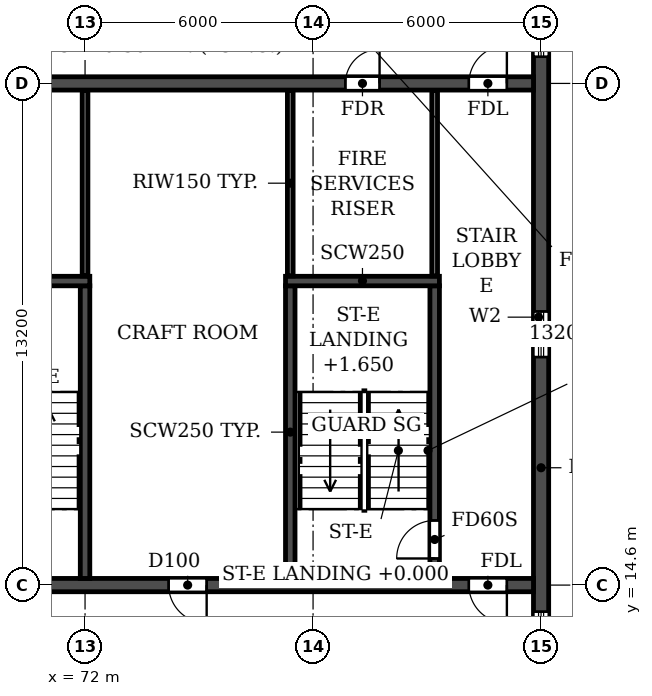
"""IFC4 building model, lengths in metres.
Left out: names, types, materials, properties, quantities, classifications, styles, units other than length and angle.
Written with IfcOpenShell. Run it as: python <this file> out.ifc"""

import sys

from ifc_helpers import new_model, si_unit, direction, frame, frame_2d, origin, place, context, subcontext, project, spatial, rectangle, extrude, element, fill, save


model = new_model("IFC4")
c1 = context("Model", 3, precision=1e-05, world=origin(), true_north=direction((0.0, 1.0)))
c2 = subcontext(c1, "Body", "Model", "MODEL_VIEW")
j1 = project(units=[si_unit("LENGTHUNIT", "METRE"), si_unit("PLANEANGLEUNIT", "RADIAN")], contexts=[c1])
p1 = place(None, origin())
s1 = spatial("IfcSite", under=j1, at=p1, CompositionType="ELEMENT")
p2 = place(p1, origin())
s2 = spatial("IfcBuilding", under=s1, at=p2, CompositionType="ELEMENT")
p3 = place(p2, frame((0.0, 0.0, 251.1)))
s3 = spatial("IfcBuildingStorey", under=s2, at=p3, CompositionType="ELEMENT", Elevation=251.1)
p4 = place(p3, frame((84.0, 4.683, 0.0), z_axis=(0.0, 0.0, 1.0), x_axis=(0.0, 1.0, 0.0)))
e1 = element("IfcWall", 1, at=p4, inside=s3, PredefinedType="SHEAR", context=c2, shape_type="SweptSolid", body=[
    extrude(rectangle(XDim=31.834, YDim=0.4, at=frame_2d((15.917, 0.0))), origin(), (0.0, 0.0, 1.0), 3.08),
])
p5 = place(p4, frame((23.817, 0.0, 0.9)))
e2 = element("IfcOpeningElement", 2, at=p5, cuts=e1, PredefinedType="OPENING", context=c2, shape_type="SweptSolid", body=[
    extrude(rectangle(XDim=1.2, YDim=1.5, at=frame_2d((0.6, 0.75))), frame((0.0, 0.21, 0.0), z_axis=(0.0, -1.0, 0.0), x_axis=(1.0, 0.0, 0.0)), (0.0, 0.0, 1.0), 0.42),
])
p6 = place(p4, frame((8.017, 0.0, 0.9)))
e3 = element("IfcOpeningElement", 3, at=p6, cuts=e1, PredefinedType="OPENING", context=c2, shape_type="SweptSolid", body=[
    extrude(rectangle(XDim=1.2, YDim=1.5, at=frame_2d((0.6, 0.75))), frame((0.0, 0.21, 0.0), z_axis=(0.0, -1.0, 0.0), x_axis=(1.0, 0.0, 0.0)), (0.0, 0.0, 1.0), 0.42),
])
p7 = place(p4, frame((27.694, 0.0, 0.6)))
e4 = element("IfcOpeningElement", 4, at=p7, cuts=e1, PredefinedType="OPENING", context=c2, shape_type="SweptSolid", body=[
    extrude(rectangle(XDim=2.2, YDim=1.8, at=frame_2d((1.1, 0.9))), frame((0.0, 0.21, 0.0), z_axis=(0.0, -1.0, 0.0), x_axis=(1.0, 0.0, 0.0)), (0.0, 0.0, 1.0), 0.42),
])
p8 = place(p4, frame((2.541, 0.0, 0.6)))
e5 = element("IfcOpeningElement", 5, at=p8, cuts=e1, PredefinedType="OPENING", context=c2, shape_type="SweptSolid", body=[
    extrude(rectangle(XDim=2.2, YDim=1.8, at=frame_2d((1.1, 0.9))), frame((0.0, 0.21, 0.0), z_axis=(0.0, -1.0, 0.0), x_axis=(1.0, 0.0, 0.0)), (0.0, 0.0, 1.0), 0.42),
])
p9 = place(p4, frame((15.917, 0.0, 0.9)))
e6 = element("IfcOpeningElement", 6, at=p9, cuts=e1, PredefinedType="OPENING", context=c2, shape_type="SweptSolid", body=[
    extrude(rectangle(XDim=1.2, YDim=1.5, at=frame_2d((0.6, 0.75))), frame((0.0, 0.21, 0.0), z_axis=(0.0, -1.0, 0.0), x_axis=(1.0, 0.0, 0.0)), (0.0, 0.0, 1.0), 0.42),
])
p10 = place(p3, frame((18.2, 14.6, 0.0), z_axis=(0.0, 0.0, 1.0), x_axis=(1.0, 0.0, 0.0)))
e7 = element("IfcWall", 7, at=p10, inside=s3, PredefinedType="SOLIDWALL", context=c2, shape_type="SweptSolid", body=[
    extrude(rectangle(XDim=65.6, YDim=0.35, at=frame_2d((32.8, 0.0))), origin(), (0.0, 0.0, 1.0), 3.08),
])
p11 = place(p10, frame((0.7, 0.0, 0.0)))
e8 = element("IfcOpeningElement", 8, at=p11, cuts=e7, PredefinedType="OPENING", context=c2, shape_type="SweptSolid", body=[
    extrude(rectangle(XDim=1.0, YDim=2.1, at=frame_2d((0.5, 1.05))), frame((0.0, 0.185, 0.0), z_axis=(0.0, -1.0, 0.0), x_axis=(1.0, 0.0, 0.0)), (0.0, 0.0, 1.0), 0.37),
])
p12 = place(p10, frame((8.6, 0.0, 0.0)))
e9 = element("IfcOpeningElement", 9, at=p12, cuts=e7, PredefinedType="OPENING", context=c2, shape_type="SweptSolid", body=[
    extrude(rectangle(XDim=1.0, YDim=2.1, at=frame_2d((0.5, 1.05))), frame((0.0, 0.185, 0.0), z_axis=(0.0, -1.0, 0.0), x_axis=(1.0, 0.0, 0.0)), (0.0, 0.0, 1.0), 0.37),
])
p13 = place(p10, frame((13.2, 0.0, 0.0)))
e10 = element("IfcOpeningElement", 10, at=p13, cuts=e7, PredefinedType="OPENING", context=c2, shape_type="SweptSolid", body=[
    extrude(rectangle(XDim=1.0, YDim=2.1, at=frame_2d((0.5, 1.05))), frame((0.0, 0.185, 0.0), z_axis=(0.0, -1.0, 0.0), x_axis=(1.0, 0.0, 0.0)), (0.0, 0.0, 1.0), 0.37),
])
p14 = place(p10, frame((24.5, 0.0, 0.0)))
e11 = element("IfcOpeningElement", 11, at=p14, cuts=e7, PredefinedType="OPENING", context=c2, shape_type="SweptSolid", body=[
    extrude(rectangle(XDim=1.0, YDim=2.1, at=frame_2d((0.5, 1.05))), frame((0.0, 0.185, 0.0), z_axis=(0.0, -1.0, 0.0), x_axis=(1.0, 0.0, 0.0)), (0.0, 0.0, 1.0), 0.37),
])
p15 = place(p10, frame((28.4, 0.0, 0.0)))
e12 = element("IfcOpeningElement", 12, at=p15, cuts=e7, PredefinedType="OPENING", context=c2, shape_type="SweptSolid", body=[
    extrude(rectangle(XDim=1.0, YDim=2.1, at=frame_2d((0.5, 1.05))), frame((0.0, 0.185, 0.0), z_axis=(0.0, -1.0, 0.0), x_axis=(1.0, 0.0, 0.0)), (0.0, 0.0, 1.0), 0.37),
])
p16 = place(p10, frame((32.3, 0.0, 0.0)))
e13 = element("IfcOpeningElement", 13, at=p16, cuts=e7, PredefinedType="OPENING", context=c2, shape_type="SweptSolid", body=[
    extrude(rectangle(XDim=1.0, YDim=2.1, at=frame_2d((0.5, 1.05))), frame((0.0, 0.185, 0.0), z_axis=(0.0, -1.0, 0.0), x_axis=(1.0, 0.0, 0.0)), (0.0, 0.0, 1.0), 0.37),
])
p17 = place(p10, frame((34.9, 0.0, 0.0)))
e14 = element("IfcOpeningElement", 14, at=p17, cuts=e7, PredefinedType="OPENING", context=c2, shape_type="SweptSolid", body=[
    extrude(rectangle(XDim=1.0, YDim=2.1, at=frame_2d((0.5, 1.05))), frame((0.0, 0.185, 0.0), z_axis=(0.0, -1.0, 0.0), x_axis=(1.0, 0.0, 0.0)), (0.0, 0.0, 1.0), 0.37),
])
p18 = place(p10, frame((38.8, 0.0, 0.0)))
e15 = element("IfcOpeningElement", 15, at=p18, cuts=e7, PredefinedType="OPENING", context=c2, shape_type="SweptSolid", body=[
    extrude(rectangle(XDim=1.0, YDim=2.1, at=frame_2d((0.5, 1.05))), frame((0.0, 0.185, 0.0), z_axis=(0.0, -1.0, 0.0), x_axis=(1.0, 0.0, 0.0)), (0.0, 0.0, 1.0), 0.37),
])
p19 = place(p10, frame((51.4, 0.0, 0.0)))
e16 = element("IfcOpeningElement", 16, at=p19, cuts=e7, PredefinedType="OPENING", context=c2, shape_type="SweptSolid", body=[
    extrude(rectangle(XDim=1.0, YDim=2.1, at=frame_2d((0.5, 1.05))), frame((0.0, 0.185, 0.0), z_axis=(0.0, -1.0, 0.0), x_axis=(1.0, 0.0, 0.0)), (0.0, 0.0, 1.0), 0.37),
])
p20 = place(p10, frame((56.0, 0.0, 0.0)))
e17 = element("IfcOpeningElement", 17, at=p20, cuts=e7, PredefinedType="OPENING", context=c2, shape_type="SweptSolid", body=[
    extrude(rectangle(XDim=1.0, YDim=2.1, at=frame_2d((0.5, 1.05))), frame((0.0, 0.185, 0.0), z_axis=(0.0, -1.0, 0.0), x_axis=(1.0, 0.0, 0.0)), (0.0, 0.0, 1.0), 0.37),
])
p21 = place(p10, frame((63.9, 0.0, 0.0)))
e18 = element("IfcOpeningElement", 18, at=p21, cuts=e7, PredefinedType="OPENING", context=c2, shape_type="SweptSolid", body=[
    extrude(rectangle(XDim=1.0, YDim=2.1, at=frame_2d((0.5, 1.05))), frame((0.0, 0.185, 0.0), z_axis=(0.0, -1.0, 0.0), x_axis=(1.0, 0.0, 0.0)), (0.0, 0.0, 1.0), 0.37),
])
p22 = place(p3, frame((18.2, 27.8, 0.0), z_axis=(0.0, 0.0, 1.0), x_axis=(1.0, 0.0, 0.0)))
e19 = element("IfcWall", 19, at=p22, inside=s3, PredefinedType="SOLIDWALL", context=c2, shape_type="SweptSolid", body=[
    extrude(rectangle(XDim=65.6, YDim=0.35, at=frame_2d((32.8, 0.0))), origin(), (0.0, 0.0, 1.0), 3.08),
])
p23 = place(p22, frame((0.7, 0.0, 0.0)))
e20 = element("IfcOpeningElement", 20, at=p23, cuts=e19, PredefinedType="OPENING", context=c2, shape_type="SweptSolid", body=[
    extrude(rectangle(XDim=1.0, YDim=2.1, at=frame_2d((0.5, 1.05))), frame((0.0, 0.185, 0.0), z_axis=(0.0, -1.0, 0.0), x_axis=(1.0, 0.0, 0.0)), (0.0, 0.0, 1.0), 0.37),
])
p24 = place(p22, frame((4.05, 0.0, 0.0)))
e21 = element("IfcOpeningElement", 21, at=p24, cuts=e19, PredefinedType="OPENING", context=c2, shape_type="SweptSolid", body=[
    extrude(rectangle(XDim=0.9, YDim=2.1, at=frame_2d((0.45, 1.05))), frame((0.0, 0.185, 0.0), z_axis=(0.0, -1.0, 0.0), x_axis=(1.0, 0.0, 0.0)), (0.0, 0.0, 1.0), 0.37),
])
p25 = place(p22, frame((13.25, 0.0, 0.0)))
e22 = element("IfcOpeningElement", 22, at=p25, cuts=e19, PredefinedType="OPENING", context=c2, shape_type="SweptSolid", body=[
    extrude(rectangle(XDim=0.9, YDim=2.1, at=frame_2d((0.45, 1.05))), frame((0.0, 0.185, 0.0), z_axis=(0.0, -1.0, 0.0), x_axis=(1.0, 0.0, 0.0)), (0.0, 0.0, 1.0), 0.37),
])
p26 = place(p22, frame((19.0, 0.0, 0.0)))
e23 = element("IfcOpeningElement", 23, at=p26, cuts=e19, PredefinedType="OPENING", context=c2, shape_type="SweptSolid", body=[
    extrude(rectangle(XDim=1.0, YDim=2.1, at=frame_2d((0.5, 1.05))), frame((0.0, 0.185, 0.0), z_axis=(0.0, -1.0, 0.0), x_axis=(1.0, 0.0, 0.0)), (0.0, 0.0, 1.0), 0.37),
])
p27 = place(p22, frame((24.2, 0.0, 0.0)))
e24 = element("IfcOpeningElement", 24, at=p27, cuts=e19, PredefinedType="OPENING", context=c2, shape_type="SweptSolid", body=[
    extrude(rectangle(XDim=1.0, YDim=2.1, at=frame_2d((0.5, 1.05))), frame((0.0, 0.185, 0.0), z_axis=(0.0, -1.0, 0.0), x_axis=(1.0, 0.0, 0.0)), (0.0, 0.0, 1.0), 0.37),
])
p28 = place(p22, frame((29.4, 0.0, 0.0)))
e25 = element("IfcOpeningElement", 25, at=p28, cuts=e19, PredefinedType="OPENING", context=c2, shape_type="SweptSolid", body=[
    extrude(rectangle(XDim=1.0, YDim=2.1, at=frame_2d((0.5, 1.05))), frame((0.0, 0.185, 0.0), z_axis=(0.0, -1.0, 0.0), x_axis=(1.0, 0.0, 0.0)), (0.0, 0.0, 1.0), 0.37),
])
p29 = place(p22, frame((32.3, 0.0, 0.0)))
e26 = element("IfcOpeningElement", 26, at=p29, cuts=e19, PredefinedType="OPENING", context=c2, shape_type="SweptSolid", body=[
    extrude(rectangle(XDim=1.0, YDim=2.1, at=frame_2d((0.5, 1.05))), frame((0.0, 0.185, 0.0), z_axis=(0.0, -1.0, 0.0), x_axis=(1.0, 0.0, 0.0)), (0.0, 0.0, 1.0), 0.37),
])
p30 = place(p22, frame((36.5, 0.0, 0.0)))
e27 = element("IfcOpeningElement", 27, at=p30, cuts=e19, PredefinedType="OPENING", context=c2, shape_type="SweptSolid", body=[
    extrude(rectangle(XDim=1.0, YDim=2.1, at=frame_2d((0.5, 1.05))), frame((0.0, 0.185, 0.0), z_axis=(0.0, -1.0, 0.0), x_axis=(1.0, 0.0, 0.0)), (0.0, 0.0, 1.0), 0.37),
])
p31 = place(p22, frame((40.4, 0.0, 0.0)))
e28 = element("IfcOpeningElement", 28, at=p31, cuts=e19, PredefinedType="OPENING", context=c2, shape_type="SweptSolid", body=[
    extrude(rectangle(XDim=1.0, YDim=2.1, at=frame_2d((0.5, 1.05))), frame((0.0, 0.185, 0.0), z_axis=(0.0, -1.0, 0.0), x_axis=(1.0, 0.0, 0.0)), (0.0, 0.0, 1.0), 0.37),
])
p32 = place(p22, frame((43.0, 0.0, 0.0)))
e29 = element("IfcOpeningElement", 29, at=p32, cuts=e19, PredefinedType="OPENING", context=c2, shape_type="SweptSolid", body=[
    extrude(rectangle(XDim=1.0, YDim=2.1, at=frame_2d((0.5, 1.05))), frame((0.0, 0.185, 0.0), z_axis=(0.0, -1.0, 0.0), x_axis=(1.0, 0.0, 0.0)), (0.0, 0.0, 1.0), 0.37),
])
p33 = place(p22, frame((46.65, 0.0, 0.0)))
e30 = element("IfcOpeningElement", 30, at=p33, cuts=e19, PredefinedType="OPENING", context=c2, shape_type="SweptSolid", body=[
    extrude(rectangle(XDim=1.5, YDim=2.1, at=frame_2d((0.75, 1.05))), frame((0.0, 0.185, 0.0), z_axis=(0.0, -1.0, 0.0), x_axis=(1.0, 0.0, 0.0)), (0.0, 0.0, 1.0), 0.37),
])
p34 = place(p22, frame((51.45, 0.0, 0.0)))
e31 = element("IfcOpeningElement", 31, at=p34, cuts=e19, PredefinedType="OPENING", context=c2, shape_type="SweptSolid", body=[
    extrude(rectangle(XDim=0.9, YDim=2.1, at=frame_2d((0.45, 1.05))), frame((0.0, 0.185, 0.0), z_axis=(0.0, -1.0, 0.0), x_axis=(1.0, 0.0, 0.0)), (0.0, 0.0, 1.0), 0.37),
])
p35 = place(p22, frame((60.65, 0.0, 0.0)))
e32 = element("IfcOpeningElement", 32, at=p35, cuts=e19, PredefinedType="OPENING", context=c2, shape_type="SweptSolid", body=[
    extrude(rectangle(XDim=0.9, YDim=2.1, at=frame_2d((0.45, 1.05))), frame((0.0, 0.185, 0.0), z_axis=(0.0, -1.0, 0.0), x_axis=(1.0, 0.0, 0.0)), (0.0, 0.0, 1.0), 0.37),
])
p36 = place(p22, frame((63.9, 0.0, 0.0)))
e33 = element("IfcOpeningElement", 33, at=p36, cuts=e19, PredefinedType="OPENING", context=c2, shape_type="SweptSolid", body=[
    extrude(rectangle(XDim=1.0, YDim=2.1, at=frame_2d((0.5, 1.05))), frame((0.0, 0.185, 0.0), z_axis=(0.0, -1.0, 0.0), x_axis=(1.0, 0.0, 0.0)), (0.0, 0.0, 1.0), 0.37),
])
p37 = place(p3, frame((72.0, 14.775, 0.0), z_axis=(0.0, 0.0, 1.0), x_axis=(0.0, 1.0, 0.0)))
e34 = element("IfcWall", 34, at=p37, inside=s3, PredefinedType="SOLIDWALL", context=c2, shape_type="SweptSolid", body=[
    extrude(rectangle(XDim=7.7, YDim=0.25, at=frame_2d((3.85, 0.0))), origin(), (0.0, 0.0, 1.0), 3.08),
])
p38 = place(p3, frame((68.075, 22.6, 0.0), z_axis=(0.0, 0.0, 1.0), x_axis=(1.0, 0.0, 0.0)))
e35 = element("IfcWall", 35, at=p38, inside=s3, PredefinedType="SOLIDWALL", context=c2, shape_type="SweptSolid", body=[
    extrude(rectangle(XDim=4.05, YDim=0.25, at=frame_2d((2.025, 0.0))), origin(), (0.0, 0.0, 1.0), 3.08),
])
p39 = place(p3, frame((77.4, 14.775, 0.0), z_axis=(0.0, 0.0, 1.0), x_axis=(0.0, 1.0, 0.0)))
e36 = element("IfcWall", 36, at=p39, inside=s3, PredefinedType="SOLIDWALL", context=c2, shape_type="SweptSolid", body=[
    extrude(rectangle(XDim=7.7, YDim=0.25, at=frame_2d((3.85, 0.0))), origin(), (0.0, 0.0, 1.0), 3.08),
])
p40 = place(p3, frame((81.2, 14.775, 0.0), z_axis=(0.0, 0.0, 1.0), x_axis=(0.0, 1.0, 0.0)))
e37 = element("IfcWall", 37, at=p40, inside=s3, PredefinedType="SOLIDWALL", context=c2, shape_type="SweptSolid", body=[
    extrude(rectangle(XDim=7.7, YDim=0.25, at=frame_2d((3.85, 0.0))), origin(), (0.0, 0.0, 1.0), 3.08),
])
p41 = place(p40, frame((0.525, 0.0, 0.0)))
e38 = element("IfcOpeningElement", 38, at=p41, cuts=e37, PredefinedType="OPENING", context=c2, shape_type="SweptSolid", body=[
    extrude(rectangle(XDim=1.0, YDim=2.1, at=frame_2d((0.5, 1.05))), frame((0.0, 0.135, 0.0), z_axis=(0.0, -1.0, 0.0), x_axis=(1.0, 0.0, 0.0)), (0.0, 0.0, 1.0), 0.27),
])
p42 = place(p3, frame((77.275, 22.6, 0.0), z_axis=(0.0, 0.0, 1.0), x_axis=(1.0, 0.0, 0.0)))
e39 = element("IfcWall", 39, at=p42, inside=s3, PredefinedType="SOLIDWALL", context=c2, shape_type="SweptSolid", body=[
    extrude(rectangle(XDim=4.05, YDim=0.25, at=frame_2d((2.025, 0.0))), origin(), (0.0, 0.0, 1.0), 3.08),
])
for number, where, z_axis, x_axis in (
    (40, (72.0, 22.735, 0.0), (0.0, 0.0, 1.0), (0.0, 1.0, 0.0)),
    (41, (77.4, 22.735, 0.0), (0.0, 0.0, 1.0), (0.0, 1.0, 0.0)),
    (42, (81.2, 22.735, 0.0), (0.0, 0.0, 1.0), (0.0, 1.0, 0.0)),
):
    element("IfcWall", number, at=place(p3, frame(where, z_axis=z_axis, x_axis=x_axis)), inside=s3, PredefinedType="PARTITIONING", context=c2, shape_type="SweptSolid", body=[
        extrude(rectangle(XDim=4.88, YDim=0.15, at=frame_2d((2.44, 0.0))), origin(), (0.0, 0.0, 1.0), 3.08),
    ])
p43 = place(p5, origin())
e43 = element("IfcWindow", 43, at=p43, inside=s3, PartitioningType="SINGLE_PANEL", PredefinedType="WINDOW", context=c2, shape_type="SweptSolid", body=[
    extrude(rectangle(XDim=1.2, YDim=1.5, at=frame_2d((0.6, 0.75))), frame((0.0, 0.03, 0.0), z_axis=(0.0, -1.0, 0.0), x_axis=(1.0, 0.0, 0.0)), (0.0, 0.0, 1.0), 0.06),
])
fill(e2, e43)
p44 = place(p6, origin())
e44 = element("IfcWindow", 44, at=p44, inside=s3, PartitioningType="SINGLE_PANEL", PredefinedType="WINDOW", context=c2, shape_type="SweptSolid", body=[
    extrude(rectangle(XDim=1.2, YDim=1.5, at=frame_2d((0.6, 0.75))), frame((0.0, 0.03, 0.0), z_axis=(0.0, -1.0, 0.0), x_axis=(1.0, 0.0, 0.0)), (0.0, 0.0, 1.0), 0.06),
])
fill(e3, e44)
p45 = place(p9, origin())
e45 = element("IfcWindow", 45, at=p45, inside=s3, PartitioningType="SINGLE_PANEL", PredefinedType="WINDOW", context=c2, shape_type="SweptSolid", body=[
    extrude(rectangle(XDim=1.2, YDim=1.5, at=frame_2d((0.6, 0.75))), frame((0.0, 0.03, 0.0), z_axis=(0.0, -1.0, 0.0), x_axis=(1.0, 0.0, 0.0)), (0.0, 0.0, 1.0), 0.06),
])
fill(e6, e45)
p46 = place(p35, origin())
e46 = element("IfcDoor", 46, at=p46, inside=s3, OperationType="SINGLE_SWING_RIGHT", PredefinedType="DOOR", context=c2, shape_type="SweptSolid", body=[
    extrude(rectangle(XDim=0.9, YDim=2.1, at=frame_2d((0.45, 1.05))), frame((0.0, 0.025, 0.0), z_axis=(0.0, -1.0, 0.0), x_axis=(1.0, 0.0, 0.0)), (0.0, 0.0, 1.0), 0.05),
])
fill(e32, e46)
p47 = place(p36, origin())
e47 = element("IfcDoor", 47, at=p47, inside=s3, OperationType="SINGLE_SWING_RIGHT", PredefinedType="DOOR", context=c2, shape_type="SweptSolid", body=[
    extrude(rectangle(XDim=1.0, YDim=2.1, at=frame_2d((0.5, 1.05))), frame((0.0, 0.025, 0.0), z_axis=(0.0, -1.0, 0.0), x_axis=(1.0, 0.0, 0.0)), (0.0, 0.0, 1.0), 0.05),
])
fill(e33, e47)
p48 = place(p20, frame((1.0, 0.0, 0.0), z_axis=(0.0, 0.0, 1.0), x_axis=(-1.0, 0.0, 0.0)))
e48 = element("IfcDoor", 48, at=p48, inside=s3, OperationType="SINGLE_SWING_LEFT", PredefinedType="DOOR", context=c2, shape_type="SweptSolid", body=[
    extrude(rectangle(XDim=1.0, YDim=2.1, at=frame_2d((0.5, 1.05))), frame((0.0, 0.025, 0.0), z_axis=(0.0, -1.0, 0.0), x_axis=(1.0, 0.0, 0.0)), (0.0, 0.0, 1.0), 0.05),
])
fill(e17, e48)
p49 = place(p21, frame((1.0, 0.0, 0.0), z_axis=(0.0, 0.0, 1.0), x_axis=(-1.0, 0.0, 0.0)))
e49 = element("IfcDoor", 49, at=p49, inside=s3, OperationType="SINGLE_SWING_LEFT", PredefinedType="DOOR", context=c2, shape_type="SweptSolid", body=[
    extrude(rectangle(XDim=1.0, YDim=2.1, at=frame_2d((0.5, 1.05))), frame((0.0, 0.025, 0.0), z_axis=(0.0, -1.0, 0.0), x_axis=(1.0, 0.0, 0.0)), (0.0, 0.0, 1.0), 0.05),
])
fill(e18, e49)
p50 = place(p41, origin())
e50 = element("IfcDoor", 50, at=p50, inside=s3, OperationType="SINGLE_SWING_LEFT", PredefinedType="DOOR", context=c2, shape_type="SweptSolid", body=[
    extrude(rectangle(XDim=1.0, YDim=2.1, at=frame_2d((0.5, 1.05))), frame((0.0, 0.025, 0.0), z_axis=(0.0, -1.0, 0.0), x_axis=(1.0, 0.0, 0.0)), (0.0, 0.0, 1.0), 0.05),
])
fill(e38, e50)
save(model, sys.argv[1])
